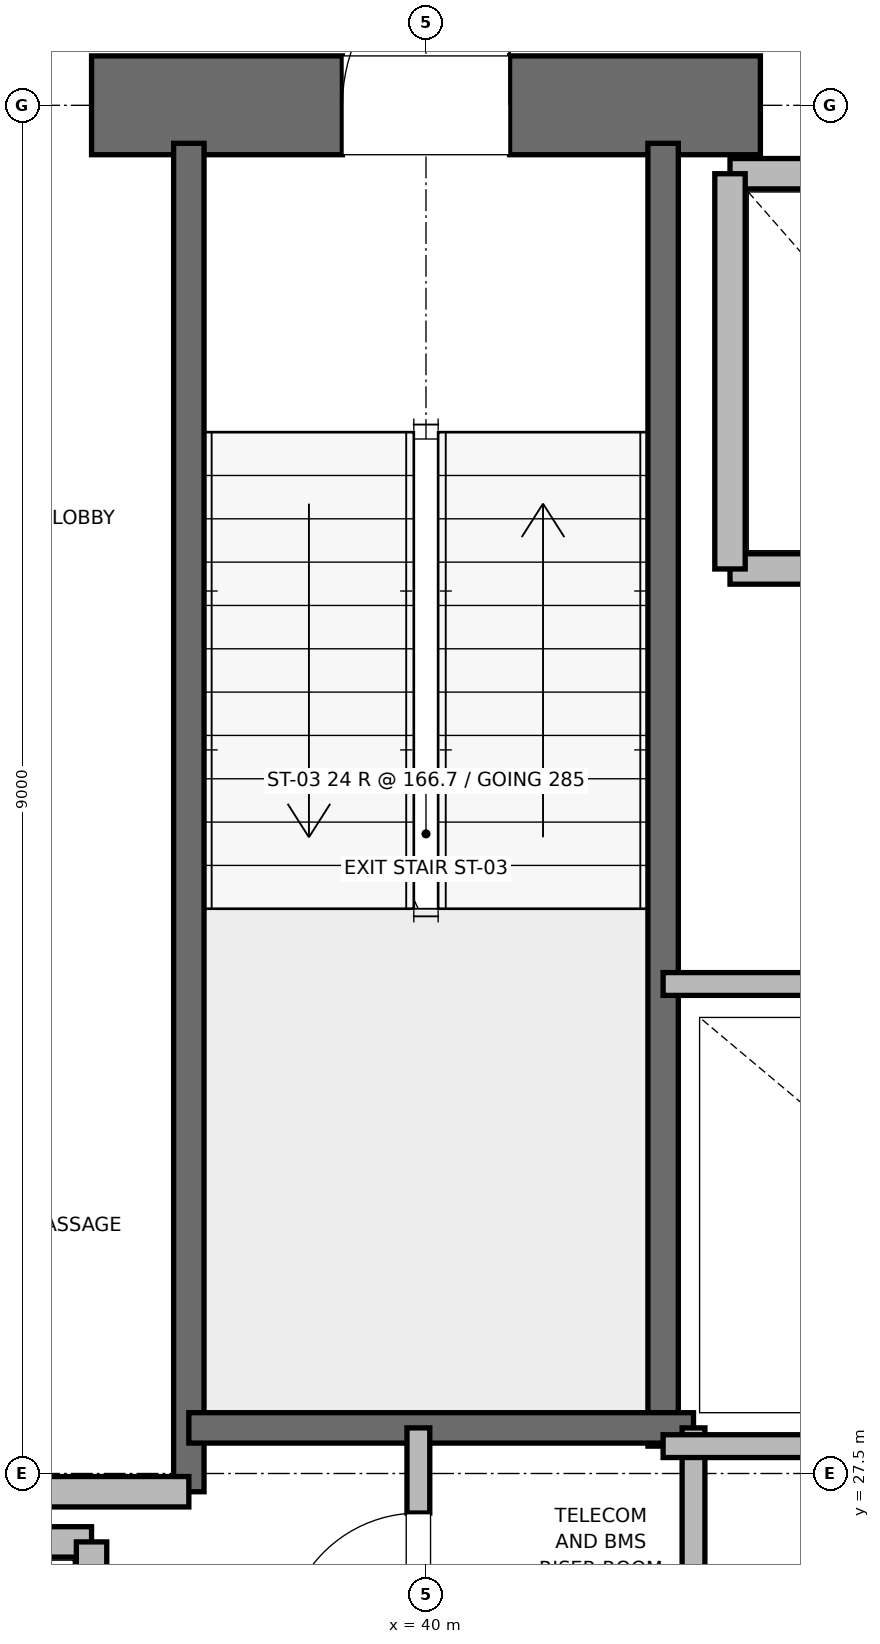
"""IFC4 building model, lengths in metres.
Left out: names, types, materials, properties, quantities, classifications, styles, units other than length and angle.
Written with IfcOpenShell. Run it as: python <this file> out.ifc"""

import sys

from ifc_helpers import new_model, si_unit, direction, frame, frame_2d, origin, place, context, subcontext, project, spatial, rectangle, extrude, element, fill, save


model = new_model("IFC4")
c1 = context("Model", 3, precision=1e-05, world=origin(), true_north=direction((0.0, 1.0)))
c2 = subcontext(c1, "Body", "Model", "MODEL_VIEW")
j1 = project(units=[si_unit("LENGTHUNIT", "METRE"), si_unit("PLANEANGLEUNIT", "RADIAN")], contexts=[c1])
p1 = place(None, origin())
s1 = spatial("IfcSite", under=j1, at=p1, CompositionType="ELEMENT")
p2 = place(p1, origin())
s2 = spatial("IfcBuilding", under=s1, at=p2, CompositionType="ELEMENT")
p3 = place(p2, frame((0.0, 0.0, 103.6)))
s3 = spatial("IfcBuildingStorey", under=s2, at=p3, CompositionType="ELEMENT", Elevation=103.6)
p4 = place(p3, frame((37.8, 36.5, 0.0), z_axis=(0.0, 0.0, 1.0), x_axis=(1.0, 0.0, 0.0)))
e1 = element("IfcWall", 1, at=p4, inside=s3, PredefinedType="SHEAR", context=c2, shape_type="SweptSolid", body=[
    extrude(rectangle(XDim=4.4, YDim=0.65, at=frame_2d((2.2, 0.0))), origin(), (0.0, 0.0, 1.0), 3.7),
])
p5 = place(p4, frame((1.65, 0.0, 0.0)))
e2 = element("IfcOpeningElement", 2, at=p5, cuts=e1, PredefinedType="OPENING", context=c2, shape_type="SweptSolid", body=[
    extrude(rectangle(XDim=1.1, YDim=2.15, at=frame_2d((0.55, 1.075))), frame((0.0, 0.325, 0.0), z_axis=(0.0, -1.0, 0.0), x_axis=(1.0, 0.0, 0.0)), (0.0, 0.0, 1.0), 0.65),
])
p6 = place(p3, frame((38.44, 27.38, 0.0), z_axis=(0.0, 0.0, 1.0), x_axis=(0.0, 1.0, 0.0)))
e3 = element("IfcWall", 3, at=p6, inside=s3, PredefinedType="SOLIDWALL", context=c2, shape_type="SweptSolid", body=[
    extrude(rectangle(XDim=8.87, YDim=0.2, at=frame_2d((4.435, 0.0))), origin(), (0.0, 0.0, 1.0), 3.7),
])
p7 = place(p3, frame((41.56, 27.68, 0.0), z_axis=(0.0, 0.0, 1.0), x_axis=(0.0, 1.0, 0.0)))
e4 = element("IfcWall", 4, at=p7, inside=s3, PredefinedType="SOLIDWALL", context=c2, shape_type="SweptSolid", body=[
    extrude(rectangle(XDim=8.57, YDim=0.2, at=frame_2d((4.285, 0.0))), origin(), (0.0, 0.0, 1.0), 3.7),
])
p8 = place(p3, frame((38.44, 27.8, 0.0), z_axis=(0.0, 0.0, 1.0), x_axis=(1.0, 0.0, 0.0)))
e5 = element("IfcWall", 5, at=p8, inside=s3, PredefinedType="SOLIDWALL", context=c2, shape_type="SweptSolid", body=[
    extrude(rectangle(XDim=3.32, YDim=0.2, at=frame_2d((1.66, 0.0))), origin(), (0.0, 0.0, 1.0), 3.7),
])
p9 = place(p3, frame((32.82, 27.38, 0.0), z_axis=(0.0, 0.0, 1.0), x_axis=(1.0, 0.0, 0.0)))
e6 = element("IfcWall", 6, at=p9, inside=s3, PredefinedType="PARTITIONING", context=c2, shape_type="SweptSolid", body=[
    extrude(rectangle(XDim=5.62, YDim=0.2, at=frame_2d((2.81, 0.0))), origin(), (0.0, 0.0, 1.0), 3.7),
])
p10 = place(p3, frame((37.8, 27.05, 0.0), z_axis=(0.0, 0.0, 1.0), x_axis=(-1.0, 0.0, 0.0)))
e7 = element("IfcWall", 7, at=p10, inside=s3, PredefinedType="SOLIDWALL", context=c2, shape_type="SweptSolid", body=[
    extrude(rectangle(XDim=2.3, YDim=0.2, at=frame_2d((1.15, 0.0))), origin(), (0.0, 0.0, 1.0), 3.7),
])
p11 = place(p3, frame((37.8, 24.45, 0.0), z_axis=(0.0, 0.0, 1.0), x_axis=(0.0, 1.0, 0.0)))
e8 = element("IfcWall", 8, at=p11, inside=s3, PredefinedType="SOLIDWALL", context=c2, shape_type="SweptSolid", body=[
    extrude(rectangle(XDim=2.6, YDim=0.2, at=frame_2d((1.3, 0.0))), origin(), (0.0, 0.0, 1.0), 3.7),
])
p12 = place(p3, frame((42.0, 33.45, 0.0), z_axis=(0.0, 0.0, 1.0), x_axis=(1.0, 0.0, 0.0)))
e9 = element("IfcWall", 9, at=p12, inside=s3, PredefinedType="SOLIDWALL", context=c2, shape_type="SweptSolid", body=[
    extrude(rectangle(XDim=2.3, YDim=0.2, at=frame_2d((1.15, 0.0))), origin(), (0.0, 0.0, 1.0), 3.7),
])
p13 = place(p3, frame((44.3, 36.05, 0.0), z_axis=(0.0, 0.0, 1.0), x_axis=(-1.0, 0.0, 0.0)))
e10 = element("IfcWall", 10, at=p13, inside=s3, PredefinedType="SOLIDWALL", context=c2, shape_type="SweptSolid", body=[
    extrude(rectangle(XDim=2.3, YDim=0.2, at=frame_2d((1.15, 0.0))), origin(), (0.0, 0.0, 1.0), 2.48),
])
p14 = place(p3, frame((42.0, 36.05, 0.0), z_axis=(0.0, 0.0, 1.0), x_axis=(0.0, -1.0, 0.0)))
e11 = element("IfcWall", 11, at=p14, inside=s3, PredefinedType="SOLIDWALL", context=c2, shape_type="SweptSolid", body=[
    extrude(rectangle(XDim=2.6, YDim=0.2, at=frame_2d((1.3, 0.0))), origin(), (0.0, 0.0, 1.0), 2.48),
])
p15 = place(p3, frame((41.76, 23.8, 0.0), z_axis=(0.0, 0.0, 1.0), x_axis=(0.0, 1.0, 0.0)))
e12 = element("IfcWall", 12, at=p15, inside=s3, PredefinedType="PARTITIONING", context=c2, shape_type="SweptSolid", body=[
    extrude(rectangle(XDim=4.0, YDim=0.15, at=frame_2d((2.0, 0.0))), origin(), (0.0, 0.0, 1.0), 2.85),
])
p16 = place(p3, frame((39.95, 25.8, 0.0), z_axis=(0.0, 0.0, 1.0), x_axis=(0.0, 1.0, 0.0)))
e13 = element("IfcWall", 13, at=p16, inside=s3, PredefinedType="PARTITIONING", context=c2, shape_type="SweptSolid", body=[
    extrude(rectangle(XDim=2.0, YDim=0.15, at=frame_2d((1.0, 0.0))), origin(), (0.0, 0.0, 1.0), 2.85),
])
p17 = place(p16, frame((0.56, 0.0, 0.0)))
e14 = element("IfcOpeningElement", 14, at=p17, cuts=e13, PredefinedType="OPENING", context=c2, shape_type="SweptSolid", body=[
    extrude(rectangle(XDim=0.88, YDim=2.1, at=frame_2d((0.44, 1.05))), frame((0.0, 0.075, 0.0), z_axis=(0.0, -1.0, 0.0), x_axis=(1.0, 0.0, 0.0)), (0.0, 0.0, 1.0), 0.15),
])
p18 = place(p3, frame((41.56, 27.68, 0.0), z_axis=(0.0, 0.0, 1.0), x_axis=(1.0, 0.0, 0.0)))
e15 = element("IfcWall", 15, at=p18, inside=s3, PredefinedType="PARTITIONING", context=c2, shape_type="SweptSolid", body=[
    extrude(rectangle(XDim=3.59, YDim=0.15, at=frame_2d((1.795, 0.0))), origin(), (0.0, 0.0, 1.0), 2.85),
])
p19 = place(p3, frame((41.56, 30.72, 0.0), z_axis=(0.0, 0.0, 1.0), x_axis=(1.0, 0.0, 0.0)))
e16 = element("IfcWall", 16, at=p19, inside=s3, PredefinedType="PARTITIONING", context=c2, shape_type="SweptSolid", body=[
    extrude(rectangle(XDim=3.59, YDim=0.15, at=frame_2d((1.795, 0.0))), origin(), (0.0, 0.0, 1.0), 2.85),
])
p20 = place(p19, frame((1.355, 0.0, 0.0)))
e17 = element("IfcOpeningElement", 17, at=p20, cuts=e16, PredefinedType="OPENING", context=c2, shape_type="SweptSolid", body=[
    extrude(rectangle(XDim=0.88, YDim=2.1, at=frame_2d((0.44, 1.05))), frame((0.0, 0.075, 0.0), z_axis=(0.0, -1.0, 0.0), x_axis=(1.0, 0.0, 0.0)), (0.0, 0.0, 1.0), 0.15),
])
p21 = place(p5, origin())
e18 = element("IfcDoor", 18, at=p21, inside=s3, OperationType="SINGLE_SWING_RIGHT", PredefinedType="DOOR", context=c2, shape_type="SweptSolid", body=[
    extrude(rectangle(XDim=1.1, YDim=2.15, at=frame_2d((0.55, 1.075))), frame((0.0, 0.025, 0.0), z_axis=(0.0, -1.0, 0.0), x_axis=(1.0, 0.0, 0.0)), (0.0, 0.0, 1.0), 0.05),
])
fill(e2, e18)
p22 = place(p17, origin())
e19 = element("IfcDoor", 19, at=p22, inside=s3, OperationType="SINGLE_SWING_LEFT", PredefinedType="DOOR", context=c2, shape_type="SweptSolid", body=[
    extrude(rectangle(XDim=0.88, YDim=2.1, at=frame_2d((0.44, 1.05))), frame((0.0, 0.025, 0.0), z_axis=(0.0, -1.0, 0.0), x_axis=(1.0, 0.0, 0.0)), (0.0, 0.0, 1.0), 0.05),
])
fill(e14, e19)
save(model, sys.argv[1])
